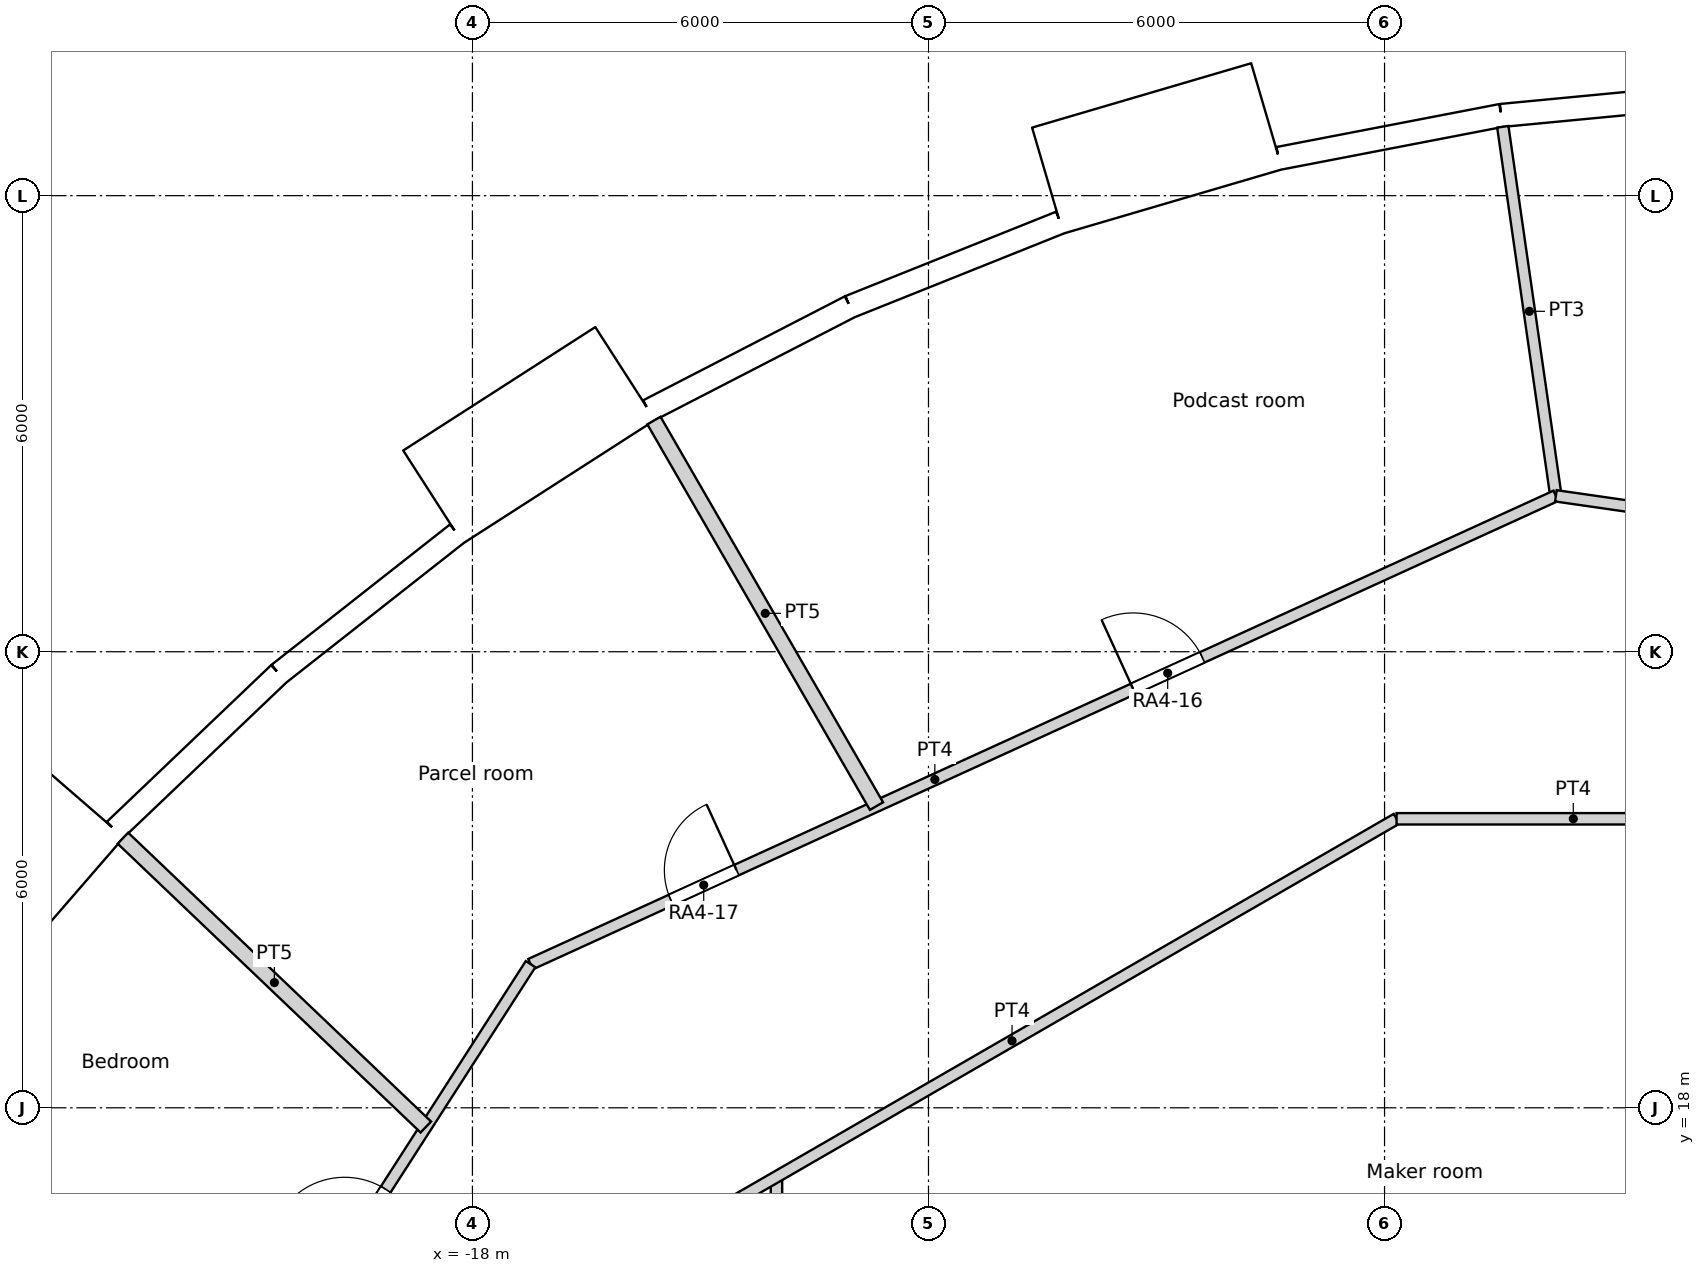
"""IFC4 building model, lengths in metres.
Left out: names, types, materials, properties, quantities, classifications, styles, units other than length and angle.
Written with IfcOpenShell. Run it as: python <this file> out.ifc"""

import sys

from ifc_helpers import new_model, si_unit, direction, frame, frame_2d, origin, origin_2d, place, context, subcontext, project, spatial, rectangle, circle, extrude, element, fill, save


model = new_model("IFC4")
c1 = context("Model", 3, precision=1e-05, world=origin(), true_north=direction((0.0, 1.0)))
c2 = subcontext(c1, "Body", "Model", "MODEL_VIEW")
j1 = project(units=[si_unit("LENGTHUNIT", "METRE"), si_unit("PLANEANGLEUNIT", "RADIAN")], contexts=[c1])
p1 = place(None, origin())
s1 = spatial("IfcSite", under=j1, at=p1, CompositionType="ELEMENT")
p2 = place(p1, origin())
s2 = spatial("IfcBuilding", under=s1, at=p2, CompositionType="ELEMENT")
p3 = place(p2, frame((0.0, 0.0, 60.6)))
s3 = spatial("IfcBuildingStorey", under=s2, at=p3, CompositionType="ELEMENT", Elevation=60.6)
for number, where, z_axis, x_axis in (
    (1, (-4.309, 29.966, 0.0), (0.0, 0.0, 1.0), (1.0, 0.0, 0.0)),
    (2, (-9.902, 28.61, 0.0), (0.0, 0.0, 1.0), (1.0, 0.0, 0.0)),
    (3, (-15.137, 26.219, 0.0), (0.0, 0.0, 1.0), (1.0, 0.0, 0.0)),
    (4, (-19.826, 22.88, 0.0), (0.0, 0.0, 1.0), (1.0, 0.0, 0.0)),
    (5, (-23.797, 18.715, 0.0), (0.0, 0.0, 1.0), (1.0, 0.0, 0.0)),
):
    element("IfcColumn", number, at=place(p3, frame(where, z_axis=z_axis, x_axis=x_axis)), inside=s3, PredefinedType="COLUMN", context=c2, shape_type="SweptSolid", body=[
        extrude(circle(Radius=0.7, at=origin_2d()), origin(), (0.0, 0.0, 1.0), 3.6),
    ])
for number, where, z_axis, x_axis in (
    (6, (-7.04, 23.516, 0.0), (0.0, 0.0, 1.0), (1.0, 0.0, 0.0)),
    (7, (-12.274, 21.259, 0.0), (0.0, 0.0, 1.0), (1.0, 0.0, 0.0)),
    (8, (-16.846, 17.855, 0.0), (0.0, 0.0, 1.0), (1.0, 0.0, 0.0)),
):
    element("IfcColumn", number, at=place(p3, frame(where, z_axis=z_axis, x_axis=x_axis)), inside=s3, PredefinedType="COLUMN", context=c2, shape_type="SweptSolid", body=[
        extrude(circle(Radius=0.75, at=origin_2d()), origin(), (0.0, 0.0, 1.0), 3.6),
    ])
for number, where, z_axis, x_axis in (
    (9, (-4.188, 18.35, 0.0), (0.0, 0.0, 1.0), (1.0, 0.0, 0.0)),
    (10, (-9.411, 16.301, 0.0), (0.0, 0.0, 1.0), (1.0, 0.0, 0.0)),
):
    element("IfcColumn", number, at=place(p3, frame(where, z_axis=z_axis, x_axis=x_axis)), inside=s3, PredefinedType="COLUMN", context=c2, shape_type="SweptSolid", body=[
        extrude(circle(Radius=0.8, at=origin_2d()), origin(), (0.0, 0.0, 1.0), 3.6),
    ])
p4 = place(p3, frame((-1.499, 31.338, 0.0), z_axis=(0.0, 0.0, 1.0), x_axis=(-0.995473351551, -0.095041077185, 0.0)))
e11 = element("IfcWall", 11, at=p4, inside=s3, PredefinedType="SOLIDWALL", context=c2, shape_type="SweptSolid", body=[
    extrude(rectangle(XDim=2.98, YDim=0.3, at=frame_2d((1.49, 0.0))), origin(), (0.0, 0.0, 1.0), 2.65),
])
p5 = place(p4, frame((1.49, 0.0, 1.55)))
e12 = element("IfcOpeningElement", 12, at=p5, cuts=e11, PredefinedType="OPENING", context=c2, shape_type="SweptSolid", body=[
    extrude(circle(Radius=0.9, at=origin_2d()), frame((0.0, 0.16, 0.0), z_axis=(0.0, -1.0, 0.0), x_axis=(1.0, 0.0, 0.0)), (0.0, 0.0, 1.0), 0.32),
])
p6 = place(p3, frame((-4.465, 31.055, 0.0), z_axis=(0.0, 0.0, 1.0), x_axis=(-0.981924535406, -0.189272836848, 0.0)))
e13 = element("IfcWall", 13, at=p6, inside=s3, PredefinedType="SOLIDWALL", context=c2, shape_type="SweptSolid", body=[
    extrude(rectangle(XDim=2.98, YDim=0.3, at=frame_2d((1.49, 0.0))), origin(), (0.0, 0.0, 1.0), 3.15),
])
p7 = place(p6, frame((1.49, 0.0, 1.55)))
e14 = element("IfcOpeningElement", 14, at=p7, cuts=e13, PredefinedType="OPENING", context=c2, shape_type="SweptSolid", body=[
    extrude(circle(Radius=0.9, at=origin_2d()), frame((0.0, 0.16, 0.0), z_axis=(0.0, -1.0, 0.0), x_axis=(1.0, 0.0, 0.0)), (0.0, 0.0, 1.0), 0.32),
])
p8 = place(p3, frame((-7.552, 31.044, -0.45), z_axis=(0.0, 0.0, 1.0), x_axis=(-0.959489813418, -0.281743319258, 0.0)))
e15 = element("IfcWall", 15, at=p8, inside=s3, PredefinedType="ELEMENTEDWALL", context=c2, shape_type="SweptSolid", body=[
    extrude(rectangle(XDim=3.0, YDim=1.45, at=frame_2d((1.5, 0.0))), origin(), (0.0, 0.0, 1.0), 3.6),
])
p9 = place(p8, frame((1.5, 0.0, 2.0)))
e16 = element("IfcOpeningElement", 16, at=p9, cuts=e15, PredefinedType="OPENING", context=c2, shape_type="SweptSolid", body=[
    extrude(circle(Radius=0.9, at=origin_2d()), frame((0.0, 0.735, 0.0), z_axis=(0.0, -1.0, 0.0), x_axis=(1.0, 0.0, 0.0)), (0.0, 0.0, 1.0), 1.47),
])
p10 = place(p3, frame((-10.267, 29.646, 0.0), z_axis=(0.0, 0.0, 1.0), x_axis=(-0.928403213937, -0.371574316054, 0.0)))
e17 = element("IfcWall", 17, at=p10, inside=s3, PredefinedType="SOLIDWALL", context=c2, shape_type="SweptSolid", body=[
    extrude(rectangle(XDim=2.98, YDim=0.3, at=frame_2d((1.49, 0.0))), origin(), (0.0, 0.0, 1.0), 2.65),
])
p11 = place(p10, frame((1.49, 0.0, 1.55)))
e18 = element("IfcOpeningElement", 18, at=p11, cuts=e17, PredefinedType="OPENING", context=c2, shape_type="SweptSolid", body=[
    extrude(circle(Radius=0.9, at=origin_2d()), frame((0.0, 0.16, 0.0), z_axis=(0.0, -1.0, 0.0), x_axis=(1.0, 0.0, 0.0)), (0.0, 0.0, 1.0), 0.32),
])
p12 = place(p3, frame((-13.033, 28.539, 0.0), z_axis=(0.0, 0.0, 1.0), x_axis=(-0.888819853856, -0.458256770153, 0.0)))
e19 = element("IfcWall", 19, at=p12, inside=s3, PredefinedType="SOLIDWALL", context=c2, shape_type="SweptSolid", body=[
    extrude(rectangle(XDim=2.98, YDim=0.3, at=frame_2d((1.49, 0.0))), origin(), (0.0, 0.0, 1.0), 3.15),
])
p13 = place(p12, frame((1.49, 0.0, 1.55)))
e20 = element("IfcOpeningElement", 20, at=p13, cuts=e19, PredefinedType="OPENING", context=c2, shape_type="SweptSolid", body=[
    extrude(circle(Radius=0.9, at=origin_2d()), frame((0.0, 0.16, 0.0), z_axis=(0.0, -1.0, 0.0), x_axis=(1.0, 0.0, 0.0)), (0.0, 0.0, 1.0), 0.32),
])
p14 = place(p3, frame((-15.992, 27.659, -0.45), z_axis=(0.0, 0.0, 1.0), x_axis=(-0.841223422347, -0.540687667415, 0.0)))
e21 = element("IfcWall", 21, at=p14, inside=s3, PredefinedType="ELEMENTEDWALL", context=c2, shape_type="SweptSolid", body=[
    extrude(rectangle(XDim=3.0, YDim=1.45, at=frame_2d((1.5, 0.0))), origin(), (0.0, 0.0, 1.0), 3.6),
])
p15 = place(p14, frame((1.5, 0.0, 2.0)))
e22 = element("IfcOpeningElement", 22, at=p15, cuts=e21, PredefinedType="OPENING", context=c2, shape_type="SweptSolid", body=[
    extrude(circle(Radius=0.9, at=origin_2d()), frame((0.0, 0.735, 0.0), z_axis=(0.0, -1.0, 0.0), x_axis=(1.0, 0.0, 0.0)), (0.0, 0.0, 1.0), 1.47),
])
p16 = place(p3, frame((-18.204, 25.553, 0.0), z_axis=(0.0, 0.0, 1.0), x_axis=(-0.786045331304, -0.618168858108, 0.0)))
e23 = element("IfcWall", 23, at=p16, inside=s3, PredefinedType="SOLIDWALL", context=c2, shape_type="SweptSolid", body=[
    extrude(rectangle(XDim=2.98, YDim=0.3, at=frame_2d((1.49, 0.0))), origin(), (0.0, 0.0, 1.0), 2.65),
])
p17 = place(p16, frame((1.49, 0.0, 1.55)))
e24 = element("IfcOpeningElement", 24, at=p17, cuts=e23, PredefinedType="OPENING", context=c2, shape_type="SweptSolid", body=[
    extrude(circle(Radius=0.9, at=origin_2d()), frame((0.0, 0.16, 0.0), z_axis=(0.0, -1.0, 0.0), x_axis=(1.0, 0.0, 0.0)), (0.0, 0.0, 1.0), 0.32),
])
p18 = place(p3, frame((-20.546, 23.711, 0.0), z_axis=(0.0, 0.0, 1.0), x_axis=(-0.723744206617, -0.690068346896, 0.0)))
e25 = element("IfcWall", 25, at=p18, inside=s3, PredefinedType="SOLIDWALL", context=c2, shape_type="SweptSolid", body=[
    extrude(rectangle(XDim=2.98, YDim=0.3, at=frame_2d((1.49, 0.0))), origin(), (0.0, 0.0, 1.0), 3.15),
])
p19 = place(p18, frame((1.49, 0.0, 1.55)))
e26 = element("IfcOpeningElement", 26, at=p19, cuts=e25, PredefinedType="OPENING", context=c2, shape_type="SweptSolid", body=[
    extrude(circle(Radius=0.9, at=origin_2d()), frame((0.0, 0.16, 0.0), z_axis=(0.0, -1.0, 0.0), x_axis=(1.0, 0.0, 0.0)), (0.0, 0.0, 1.0), 0.32),
])
p20 = place(p3, frame((-23.137, 22.033, -0.45), z_axis=(0.0, 0.0, 1.0), x_axis=(-0.654890259022, -0.75572398972, 0.0)))
e27 = element("IfcWall", 27, at=p20, inside=s3, PredefinedType="ELEMENTEDWALL", context=c2, shape_type="SweptSolid", body=[
    extrude(rectangle(XDim=3.0, YDim=1.45, at=frame_2d((1.5, 0.0))), origin(), (0.0, 0.0, 1.0), 3.6),
])
p21 = place(p20, frame((1.5, 0.0, 2.0)))
e28 = element("IfcOpeningElement", 28, at=p21, cuts=e27, PredefinedType="OPENING", context=c2, shape_type="SweptSolid", body=[
    extrude(circle(Radius=0.9, at=origin_2d()), frame((0.0, 0.735, 0.0), z_axis=(0.0, -1.0, 0.0), x_axis=(1.0, 0.0, 0.0)), (0.0, 0.0, 1.0), 1.47),
])
p22 = place(p3, frame((-5.842, 21.802, 0.0), z_axis=(0.0, 0.0, 1.0), x_axis=(1.0, 0.0, 0.0)))
e29 = element("IfcWall", 29, at=p22, inside=s3, PredefinedType="PARTITIONING", context=c2, shape_type="SweptSolid", body=[
    extrude(rectangle(XDim=4.65, YDim=0.15, at=frame_2d((2.325, 0.0))), origin(), (0.0, 0.0, 1.0), 3.15),
])
p23 = place(p3, frame((-15.96, 15.96, 0.0), z_axis=(0.0, 0.0, 1.0), x_axis=(0.866022730501, 0.500004630234, 0.0)))
e30 = element("IfcWall", 30, at=p23, inside=s3, PredefinedType="PARTITIONING", context=c2, shape_type="SweptSolid", body=[
    extrude(rectangle(XDim=11.684, YDim=0.15, at=frame_2d((5.842, 0.0))), origin(), (0.0, 0.0, 1.0), 3.15),
])
p24 = place(p3, frame((-3.746, 26.051, 0.0), z_axis=(0.0, 0.0, 1.0), x_axis=(0.98981637125, -0.142350100825, 0.0)))
e31 = element("IfcWall", 31, at=p24, inside=s3, PredefinedType="PARTITIONING", context=c2, shape_type="SweptSolid", body=[
    extrude(rectangle(XDim=14.83, YDim=0.15, at=frame_2d((7.415, 0.0))), origin(), (0.0, 0.0, 1.0), 3.15),
])
p25 = place(p24, frame((5.165, 0.0, 0.0)))
e32 = element("IfcOpeningElement", 32, at=p25, cuts=e31, PredefinedType="OPENING", context=c2, shape_type="SweptSolid", body=[
    extrude(rectangle(XDim=1.8, YDim=2.1, at=frame_2d((0.9, 1.05))), frame((0.0, 0.075, 0.0), z_axis=(0.0, -1.0, 0.0), x_axis=(1.0, 0.0, 0.0)), (0.0, 0.0, 1.0), 0.15),
])
p26 = place(p3, frame((-17.235, 19.89, 0.0), z_axis=(0.0, 0.0, 1.0), x_axis=(0.909599826886, 0.415485444907, 0.0)))
e33 = element("IfcWall", 33, at=p26, inside=s3, PredefinedType="PARTITIONING", context=c2, shape_type="SweptSolid", body=[
    extrude(rectangle(XDim=14.829, YDim=0.15, at=frame_2d((7.415, 0.0))), origin(), (0.0, 0.0, 1.0), 3.15),
])
p27 = place(p26, frame((8.715, 0.0, 0.0)))
e34 = element("IfcOpeningElement", 34, at=p27, cuts=e33, PredefinedType="OPENING", context=c2, shape_type="SweptSolid", body=[
    extrude(rectangle(XDim=1.0, YDim=2.04, at=frame_2d((0.5, 1.02))), frame((0.0, 0.075, 0.0), z_axis=(0.0, -1.0, 0.0), x_axis=(1.0, 0.0, 0.0)), (0.0, 0.0, 1.0), 0.15),
])
p28 = place(p26, frame((2.029, 0.0, 0.0)))
e35 = element("IfcOpeningElement", 35, at=p28, cuts=e33, PredefinedType="OPENING", context=c2, shape_type="SweptSolid", body=[
    extrude(rectangle(XDim=0.95, YDim=2.1, at=frame_2d((0.475, 1.05))), frame((0.0, 0.075, 0.0), z_axis=(0.0, -1.0, 0.0), x_axis=(1.0, 0.0, 0.0)), (0.0, 0.0, 1.0), 0.15),
])
p29 = place(p3, frame((-25.255, 7.416, 0.0), z_axis=(0.0, 0.0, 1.0), x_axis=(0.540805851332, 0.841147449123, 0.0)))
e36 = element("IfcWall", 36, at=p29, inside=s3, PredefinedType="PARTITIONING", context=c2, shape_type="SweptSolid", body=[
    extrude(rectangle(XDim=14.829, YDim=0.15, at=frame_2d((7.415, 0.0))), origin(), (0.0, 0.0, 1.0), 3.15),
])
p30 = place(p29, frame((10.307, 0.0, 0.0)))
e37 = element("IfcOpeningElement", 37, at=p30, cuts=e36, PredefinedType="OPENING", context=c2, shape_type="SweptSolid", body=[
    extrude(rectangle(XDim=1.0, YDim=2.1, at=frame_2d((0.5, 1.05))), frame((0.0, 0.075, 0.0), z_axis=(0.0, -1.0, 0.0), x_axis=(1.0, 0.0, 0.0)), (0.0, 0.0, 1.0), 0.15),
])
p31 = place(p29, frame((3.522, 0.0, 0.0)))
e38 = element("IfcOpeningElement", 38, at=p31, cuts=e36, PredefinedType="OPENING", context=c2, shape_type="SweptSolid", body=[
    extrude(rectangle(XDim=1.0, YDim=2.1, at=frame_2d((0.5, 1.05))), frame((0.0, 0.075, 0.0), z_axis=(0.0, -1.0, 0.0), x_axis=(1.0, 0.0, 0.0)), (0.0, 0.0, 1.0), 0.15),
])
p32 = place(p3, frame((-14.0, 11.8, 0.0), z_axis=(0.0, 0.0, 1.0), x_axis=(0.0, 1.0, 0.0)))
e39 = element("IfcWall", 39, at=p32, inside=s3, PredefinedType="PARTITIONING", context=c2, shape_type="SweptSolid", body=[
    extrude(rectangle(XDim=5.292, YDim=0.15, at=frame_2d((2.646, 0.0))), origin(), (0.0, 0.0, 1.0), 3.15),
])
p33 = place(p3, frame((-4.444, 30.906, 0.0), z_axis=(0.0, 0.0, 1.0), x_axis=(0.142306296561, -0.989822669956, 0.0)))
e40 = element("IfcWall", 40, at=p33, inside=s3, PredefinedType="PARTITIONING", context=c2, shape_type="SweptSolid", body=[
    extrude(rectangle(XDim=4.905, YDim=0.15, at=frame_2d((2.452, 0.0))), origin(), (0.0, 0.0, 1.0), 3.15),
])
p34 = place(p3, frame((-15.612, 27.041, 0.0), z_axis=(0.0, 0.0, 1.0), x_axis=(0.499954606878, -0.86605160993, 0.0)))
e41 = element("IfcWall", 41, at=p34, inside=s3, PredefinedType="PARTITIONING", context=c2, shape_type="SweptSolid", body=[
    extrude(rectangle(XDim=5.856, YDim=0.2, at=frame_2d((2.928, 0.0))), origin(), (0.0, 0.0, 1.0), 3.15),
])
p35 = place(p3, frame((-22.598, 21.547, 0.0), z_axis=(0.0, 0.0, 1.0), x_axis=(0.723689650329, -0.690125561044, 0.0)))
e42 = element("IfcWall", 42, at=p35, inside=s3, PredefinedType="PARTITIONING", context=c2, shape_type="SweptSolid", body=[
    extrude(rectangle(XDim=5.506, YDim=0.2, at=frame_2d((2.753, 0.0))), origin(), (0.0, 0.0, 1.0), 3.15),
])
p36 = place(p3, frame((-26.268, 16.881, 0.0), z_axis=(0.0, 0.0, 1.0), x_axis=(0.841333855553, -0.540515812443, 0.0)))
e43 = element("IfcWall", 43, at=p36, inside=s3, PredefinedType="PARTITIONING", context=c2, shape_type="SweptSolid", body=[
    extrude(rectangle(XDim=5.972, YDim=0.15, at=frame_2d((2.986, 0.0))), origin(), (0.0, 0.0, 1.0), 3.15),
])
p37 = place(p5, origin())
e44 = element("IfcWindow", 44, at=p37, inside=s3, PartitioningType="SINGLE_PANEL", PredefinedType="WINDOW", context=c2, shape_type="SweptSolid", body=[
    extrude(circle(Radius=0.9, at=origin_2d()), frame((0.0, 0.12, 0.0), z_axis=(0.0, -1.0, 0.0), x_axis=(1.0, 0.0, 0.0)), (0.0, 0.0, 1.0), 0.1),
])
fill(e12, e44)
p38 = place(p7, origin())
e45 = element("IfcWindow", 45, at=p38, inside=s3, PartitioningType="SINGLE_PANEL", PredefinedType="WINDOW", context=c2, shape_type="SweptSolid", body=[
    extrude(circle(Radius=0.9, at=origin_2d()), frame((0.0, 0.12, 0.0), z_axis=(0.0, -1.0, 0.0), x_axis=(1.0, 0.0, 0.0)), (0.0, 0.0, 1.0), 0.1),
])
fill(e14, e45)
p39 = place(p9, origin())
e46 = element("IfcWindow", 46, at=p39, inside=s3, PartitioningType="SINGLE_PANEL", PredefinedType="WINDOW", context=c2, shape_type="SweptSolid", body=[
    extrude(circle(Radius=0.9, at=origin_2d()), frame((0.0, 0.695, 0.0), z_axis=(0.0, -1.0, 0.0), x_axis=(1.0, 0.0, 0.0)), (0.0, 0.0, 1.0), 0.1),
])
fill(e16, e46)
p40 = place(p11, origin())
e47 = element("IfcWindow", 47, at=p40, inside=s3, PartitioningType="SINGLE_PANEL", PredefinedType="WINDOW", context=c2, shape_type="SweptSolid", body=[
    extrude(circle(Radius=0.9, at=origin_2d()), frame((0.0, 0.12, 0.0), z_axis=(0.0, -1.0, 0.0), x_axis=(1.0, 0.0, 0.0)), (0.0, 0.0, 1.0), 0.1),
])
fill(e18, e47)
p41 = place(p13, origin())
e48 = element("IfcWindow", 48, at=p41, inside=s3, PartitioningType="SINGLE_PANEL", PredefinedType="WINDOW", context=c2, shape_type="SweptSolid", body=[
    extrude(circle(Radius=0.9, at=origin_2d()), frame((0.0, 0.12, 0.0), z_axis=(0.0, -1.0, 0.0), x_axis=(1.0, 0.0, 0.0)), (0.0, 0.0, 1.0), 0.1),
])
fill(e20, e48)
p42 = place(p15, origin())
e49 = element("IfcWindow", 49, at=p42, inside=s3, PartitioningType="SINGLE_PANEL", PredefinedType="WINDOW", context=c2, shape_type="SweptSolid", body=[
    extrude(circle(Radius=0.9, at=origin_2d()), frame((0.0, 0.695, 0.0), z_axis=(0.0, -1.0, 0.0), x_axis=(1.0, 0.0, 0.0)), (0.0, 0.0, 1.0), 0.1),
])
fill(e22, e49)
p43 = place(p17, origin())
e50 = element("IfcWindow", 50, at=p43, inside=s3, PartitioningType="SINGLE_PANEL", PredefinedType="WINDOW", context=c2, shape_type="SweptSolid", body=[
    extrude(circle(Radius=0.9, at=origin_2d()), frame((0.0, 0.12, 0.0), z_axis=(0.0, -1.0, 0.0), x_axis=(1.0, 0.0, 0.0)), (0.0, 0.0, 1.0), 0.1),
])
fill(e24, e50)
p44 = place(p19, origin())
e51 = element("IfcWindow", 51, at=p44, inside=s3, PartitioningType="SINGLE_PANEL", PredefinedType="WINDOW", context=c2, shape_type="SweptSolid", body=[
    extrude(circle(Radius=0.9, at=origin_2d()), frame((0.0, 0.12, 0.0), z_axis=(0.0, -1.0, 0.0), x_axis=(1.0, 0.0, 0.0)), (0.0, 0.0, 1.0), 0.1),
])
fill(e26, e51)
p45 = place(p21, origin())
e52 = element("IfcWindow", 52, at=p45, inside=s3, PartitioningType="SINGLE_PANEL", PredefinedType="WINDOW", context=c2, shape_type="SweptSolid", body=[
    extrude(circle(Radius=0.9, at=origin_2d()), frame((0.0, 0.695, 0.0), z_axis=(0.0, -1.0, 0.0), x_axis=(1.0, 0.0, 0.0)), (0.0, 0.0, 1.0), 0.1),
])
fill(e28, e52)
p46 = place(p27, origin())
e53 = element("IfcDoor", 53, at=p46, inside=s3, OperationType="SINGLE_SWING_LEFT", PredefinedType="DOOR", context=c2, shape_type="SweptSolid", body=[
    extrude(rectangle(XDim=1.0, YDim=2.04, at=frame_2d((0.5, 1.02))), frame((0.0, 0.025, 0.0), z_axis=(0.0, -1.0, 0.0), x_axis=(1.0, 0.0, 0.0)), (0.0, 0.0, 1.0), 0.05),
])
fill(e34, e53)
p47 = place(p28, origin())
e54 = element("IfcDoor", 54, at=p47, inside=s3, OperationType="SINGLE_SWING_RIGHT", PredefinedType="DOOR", context=c2, shape_type="SweptSolid", body=[
    extrude(rectangle(XDim=0.95, YDim=2.1, at=frame_2d((0.475, 1.05))), frame((0.0, 0.025, 0.0), z_axis=(0.0, -1.0, 0.0), x_axis=(1.0, 0.0, 0.0)), (0.0, 0.0, 1.0), 0.05),
])
fill(e35, e54)
p48 = place(p30, origin())
e55 = element("IfcDoor", 55, at=p48, inside=s3, OperationType="SINGLE_SWING_LEFT", PredefinedType="DOOR", context=c2, shape_type="SweptSolid", body=[
    extrude(rectangle(XDim=1.0, YDim=2.1, at=frame_2d((0.5, 1.05))), frame((0.0, 0.025, 0.0), z_axis=(0.0, -1.0, 0.0), x_axis=(1.0, 0.0, 0.0)), (0.0, 0.0, 1.0), 0.05),
])
fill(e37, e55)
save(model, sys.argv[1])
